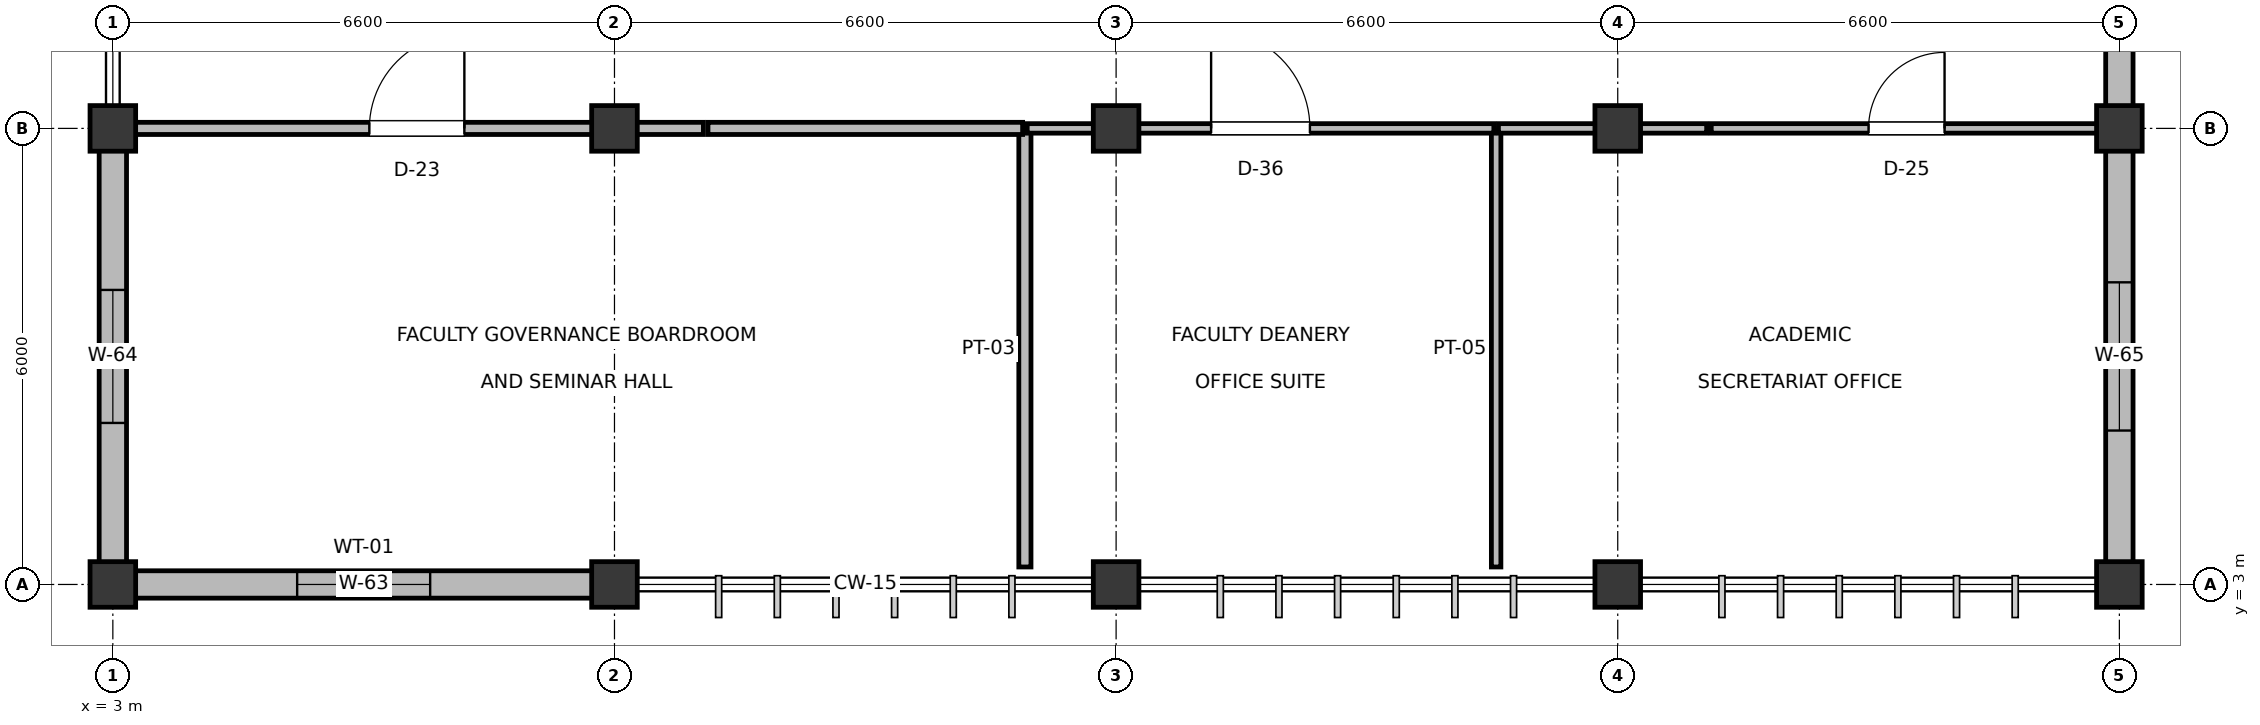
"""IFC4 building model, lengths in metres.
Left out: names, types, materials, properties, quantities, classifications, styles, units other than length and angle.
Written with IfcOpenShell. Run it as: python <this file> out.ifc"""

import sys

from ifc_helpers import new_model, si_unit, direction, frame, frame_2d, origin, origin_2d, place, context, subcontext, project, spatial, rectangle, extrude, element, fill, save


model = new_model("IFC4")
c1 = context("Model", 3, precision=1e-05, world=origin(), true_north=direction((0.0, 1.0)))
c2 = subcontext(c1, "Body", "Model", "MODEL_VIEW")
j1 = project(units=[si_unit("LENGTHUNIT", "METRE"), si_unit("PLANEANGLEUNIT", "RADIAN")], contexts=[c1])
p1 = place(None, origin())
s1 = spatial("IfcSite", under=j1, at=p1, CompositionType="ELEMENT")
p2 = place(p1, origin())
s2 = spatial("IfcBuilding", under=s1, at=p2, CompositionType="ELEMENT")
p3 = place(p2, frame((0.0, 0.0, 40.6)))
s3 = spatial("IfcBuildingStorey", under=s2, at=p3, CompositionType="ELEMENT", Elevation=40.6)
for number, where, z_axis, x_axis in (
    (1, (3.0, 3.0, 0.0), (0.0, 0.0, 1.0), (1.0, 0.0, 0.0)),
    (2, (3.0, 9.0, 0.0), (0.0, 0.0, 1.0), (1.0, 0.0, 0.0)),
    (3, (9.6, 3.0, 0.0), (0.0, 0.0, 1.0), (1.0, 0.0, 0.0)),
    (4, (9.6, 9.0, 0.0), (0.0, 0.0, 1.0), (1.0, 0.0, 0.0)),
    (5, (16.2, 3.0, 0.0), (0.0, 0.0, 1.0), (1.0, 0.0, 0.0)),
    (6, (16.2, 9.0, 0.0), (0.0, 0.0, 1.0), (1.0, 0.0, 0.0)),
    (7, (22.8, 3.0, 0.0), (0.0, 0.0, 1.0), (1.0, 0.0, 0.0)),
    (8, (22.8, 9.0, 0.0), (0.0, 0.0, 1.0), (1.0, 0.0, 0.0)),
    (9, (29.4, 3.0, 0.0), (0.0, 0.0, 1.0), (1.0, 0.0, 0.0)),
    (10, (29.4, 9.0, 0.0), (0.0, 0.0, 1.0), (1.0, 0.0, 0.0)),
):
    element("IfcColumn", number, at=place(p3, frame(where, z_axis=z_axis, x_axis=x_axis)), inside=s3, PredefinedType="COLUMN", context=c2, shape_type="SweptSolid", body=[
        extrude(rectangle(XDim=0.6, YDim=0.6, at=origin_2d()), origin(), (0.0, 0.0, 1.0), 4.0),
    ])
p4 = place(p3, frame((3.285, 3.0, 0.0), z_axis=(0.0, 0.0, 1.0), x_axis=(1.0, 0.0, 0.0)))
e11 = element("IfcWall", 11, at=p4, inside=s3, PredefinedType="SOLIDWALL", context=c2, shape_type="SweptSolid", body=[
    extrude(rectangle(XDim=6.03, YDim=0.36, at=frame_2d((3.015, 0.0))), origin(), (0.0, 0.0, 1.0), 3.045),
])
p5 = place(p4, frame((2.14, 0.0, 0.9)))
e12 = element("IfcOpeningElement", 12, at=p5, cuts=e11, PredefinedType="OPENING", context=c2, shape_type="SweptSolid", body=[
    extrude(rectangle(XDim=1.75, YDim=1.55, at=frame_2d((0.875, 0.775))), frame((0.0, 0.19, 0.0), z_axis=(0.0, -1.0, 0.0), x_axis=(1.0, 0.0, 0.0)), (0.0, 0.0, 1.0), 0.38),
])
p6 = place(p3, frame((3.0, 3.285, 0.0), z_axis=(0.0, 0.0, 1.0), x_axis=(0.0, 1.0, 0.0)))
e13 = element("IfcWall", 13, at=p6, inside=s3, PredefinedType="SOLIDWALL", context=c2, shape_type="SweptSolid", body=[
    extrude(rectangle(XDim=5.43, YDim=0.36, at=frame_2d((2.715, 0.0))), origin(), (0.0, 0.0, 1.0), 3.045),
])
p7 = place(p6, frame((1.84, 0.0, 0.9)))
e14 = element("IfcOpeningElement", 14, at=p7, cuts=e13, PredefinedType="OPENING", context=c2, shape_type="SweptSolid", body=[
    extrude(rectangle(XDim=1.75, YDim=1.75, at=frame_2d((0.875, 0.875))), frame((0.0, 0.19, 0.0), z_axis=(0.0, -1.0, 0.0), x_axis=(1.0, 0.0, 0.0)), (0.0, 0.0, 1.0), 0.38),
])
p8 = place(p3, frame((29.4, 3.285, 0.0), z_axis=(0.0, 0.0, 1.0), x_axis=(0.0, 1.0, 0.0)))
e15 = element("IfcWall", 15, at=p8, inside=s3, PredefinedType="SOLIDWALL", context=c2, shape_type="SweptSolid", body=[
    extrude(rectangle(XDim=5.43, YDim=0.36, at=frame_2d((2.715, 0.0))), origin(), (0.0, 0.0, 1.0), 3.095),
])
p9 = place(p8, frame((1.74, 0.0, 0.9)))
e16 = element("IfcOpeningElement", 16, at=p9, cuts=e15, PredefinedType="OPENING", context=c2, shape_type="SweptSolid", body=[
    extrude(rectangle(XDim=1.95, YDim=1.15, at=frame_2d((0.975, 0.575))), frame((0.0, 0.19, 0.0), z_axis=(0.0, -1.0, 0.0), x_axis=(1.0, 0.0, 0.0)), (0.0, 0.0, 1.0), 0.38),
])
p10 = place(p3, frame((29.4, 9.285, 0.0), z_axis=(0.0, 0.0, 1.0), x_axis=(0.0, 1.0, 0.0)))
e17 = element("IfcWall", 17, at=p10, inside=s3, PredefinedType="SOLIDWALL", context=c2, shape_type="SweptSolid", body=[
    extrude(rectangle(XDim=13.83, YDim=0.36, at=frame_2d((6.915, 0.0))), origin(), (0.0, 0.0, 1.0), 2.895),
])
p11 = place(p10, frame((5.94, 0.0, 0.9)))
e18 = element("IfcOpeningElement", 18, at=p11, cuts=e17, PredefinedType="OPENING", context=c2, shape_type="SweptSolid", body=[
    extrude(rectangle(XDim=1.95, YDim=1.35, at=frame_2d((0.975, 0.675))), frame((0.0, 0.19, 0.0), z_axis=(0.0, -1.0, 0.0), x_axis=(1.0, 0.0, 0.0)), (0.0, 0.0, 1.0), 0.38),
])
p12 = place(p3, frame((15.0, 3.23, 0.0), z_axis=(0.0, 0.0, 1.0), x_axis=(0.0, 1.0, 0.0)))
e19 = element("IfcWall", 19, at=p12, inside=s3, PredefinedType="PARTITIONING", context=c2, shape_type="SweptSolid", body=[
    extrude(rectangle(XDim=5.74, YDim=0.16, at=frame_2d((2.87, 0.0))), origin(), (0.0, 0.0, 1.0), 2.995),
])
p13 = place(p3, frame((3.23, 9.0, 0.0), z_axis=(0.0, 0.0, 1.0), x_axis=(1.0, 0.0, 0.0)))
e20 = element("IfcWall", 20, at=p13, inside=s3, PredefinedType="PARTITIONING", context=c2, shape_type="SweptSolid", body=[
    extrude(rectangle(XDim=7.54, YDim=0.16, at=frame_2d((3.77, 0.0))), origin(), (0.0, 0.0, 1.0), 2.925),
])
p14 = place(p13, frame((3.145, 0.0, 0.0)))
e21 = element("IfcOpeningElement", 21, at=p14, cuts=e20, PredefinedType="OPENING", context=c2, shape_type="SweptSolid", body=[
    extrude(rectangle(XDim=1.25, YDim=2.2, at=frame_2d((0.625, 1.1))), frame((0.0, 0.09, 0.0), z_axis=(0.0, -1.0, 0.0), x_axis=(1.0, 0.0, 0.0)), (0.0, 0.0, 1.0), 0.18),
])
p15 = place(p3, frame((10.83, 9.0, 0.0), z_axis=(0.0, 0.0, 1.0), x_axis=(1.0, 0.0, 0.0)))
e22 = element("IfcWall", 22, at=p15, inside=s3, PredefinedType="PARTITIONING", context=c2, shape_type="SweptSolid", body=[
    extrude(rectangle(XDim=4.14, YDim=0.16, at=frame_2d((2.07, 0.0))), origin(), (0.0, 0.0, 1.0), 2.995),
])
p16 = place(p3, frame((21.2, 3.23, 0.0), z_axis=(0.0, 0.0, 1.0), x_axis=(0.0, 1.0, 0.0)))
e23 = element("IfcWall", 23, at=p16, inside=s3, PredefinedType="PARTITIONING", context=c2, shape_type="SweptSolid", body=[
    extrude(rectangle(XDim=5.74, YDim=0.125, at=frame_2d((2.87, 0.0))), origin(), (0.0, 0.0, 1.0), 2.885),
])
p17 = place(p3, frame((15.03, 9.0, 0.0), z_axis=(0.0, 0.0, 1.0), x_axis=(1.0, 0.0, 0.0)))
e24 = element("IfcWall", 24, at=p17, inside=s3, PredefinedType="PARTITIONING", context=c2, shape_type="SweptSolid", body=[
    extrude(rectangle(XDim=6.14, YDim=0.125, at=frame_2d((3.07, 0.0))), origin(), (0.0, 0.0, 1.0), 2.885),
])
p18 = place(p17, frame((2.42, 0.0, 0.0)))
e25 = element("IfcOpeningElement", 25, at=p18, cuts=e24, PredefinedType="OPENING", context=c2, shape_type="SweptSolid", body=[
    extrude(rectangle(XDim=1.3, YDim=2.2, at=frame_2d((0.65, 1.1))), frame((0.0, 0.073, 0.0), z_axis=(0.0, -1.0, 0.0), x_axis=(1.0, 0.0, 0.0)), (0.0, 0.0, 1.0), 0.145),
])
p19 = place(p3, frame((24.03, 9.0, 0.0), z_axis=(0.0, 0.0, 1.0), x_axis=(1.0, 0.0, 0.0)))
e26 = element("IfcWall", 26, at=p19, inside=s3, PredefinedType="PARTITIONING", context=c2, shape_type="SweptSolid", body=[
    extrude(rectangle(XDim=5.14, YDim=0.125, at=frame_2d((2.57, 0.0))), origin(), (0.0, 0.0, 1.0), 2.995),
])
p20 = place(p19, frame((2.07, 0.0, 0.0)))
e27 = element("IfcOpeningElement", 27, at=p20, cuts=e26, PredefinedType="OPENING", context=c2, shape_type="SweptSolid", body=[
    extrude(rectangle(XDim=1.0, YDim=2.15, at=frame_2d((0.5, 1.075))), frame((0.0, 0.073, 0.0), z_axis=(0.0, -1.0, 0.0), x_axis=(1.0, 0.0, 0.0)), (0.0, 0.0, 1.0), 0.145),
])
p21 = place(p3, frame((21.23, 9.0, 0.0), z_axis=(0.0, 0.0, 1.0), x_axis=(1.0, 0.0, 0.0)))
e28 = element("IfcWall", 28, at=p21, inside=s3, PredefinedType="PARTITIONING", context=c2, shape_type="SweptSolid", body=[
    extrude(rectangle(XDim=2.74, YDim=0.125, at=frame_2d((1.37, 0.0))), origin(), (0.0, 0.0, 1.0), 2.885),
])
p22 = place(p5, frame((1.75, 0.0, 0.0), z_axis=(0.0, 0.0, 1.0), x_axis=(-1.0, 0.0, 0.0)))
e29 = element("IfcWindow", 29, at=p22, inside=s3, PartitioningType="DOUBLE_PANEL_VERTICAL", PredefinedType="WINDOW", context=c2, shape_type="SweptSolid", body=[
    extrude(rectangle(XDim=1.75, YDim=1.55, at=frame_2d((0.875, 0.775))), frame((0.0, 0.03, 0.0), z_axis=(0.0, -1.0, 0.0), x_axis=(1.0, 0.0, 0.0)), (0.0, 0.0, 1.0), 0.06),
])
fill(e12, e29)
p23 = place(p7, origin())
e30 = element("IfcWindow", 30, at=p23, inside=s3, PartitioningType="DOUBLE_PANEL_VERTICAL", PredefinedType="WINDOW", context=c2, shape_type="SweptSolid", body=[
    extrude(rectangle(XDim=1.75, YDim=1.75, at=frame_2d((0.875, 0.875))), frame((0.0, 0.03, 0.0), z_axis=(0.0, -1.0, 0.0), x_axis=(1.0, 0.0, 0.0)), (0.0, 0.0, 1.0), 0.06),
])
fill(e14, e30)
p24 = place(p9, frame((1.95, 0.0, 0.0), z_axis=(0.0, 0.0, 1.0), x_axis=(-1.0, 0.0, 0.0)))
e31 = element("IfcWindow", 31, at=p24, inside=s3, PartitioningType="DOUBLE_PANEL_VERTICAL", PredefinedType="WINDOW", context=c2, shape_type="SweptSolid", body=[
    extrude(rectangle(XDim=1.95, YDim=1.15, at=frame_2d((0.975, 0.575))), frame((0.0, 0.03, 0.0), z_axis=(0.0, -1.0, 0.0), x_axis=(1.0, 0.0, 0.0)), (0.0, 0.0, 1.0), 0.06),
])
fill(e16, e31)
p25 = place(p14, origin())
e32 = element("IfcDoor", 32, at=p25, inside=s3, OperationType="SINGLE_SWING_RIGHT", PredefinedType="DOOR", context=c2, shape_type="SweptSolid", body=[
    extrude(rectangle(XDim=1.25, YDim=2.2, at=frame_2d((0.625, 1.1))), frame((0.0, 0.025, 0.0), z_axis=(0.0, -1.0, 0.0), x_axis=(1.0, 0.0, 0.0)), (0.0, 0.0, 1.0), 0.05),
])
fill(e21, e32)
p26 = place(p18, origin())
e33 = element("IfcDoor", 33, at=p26, inside=s3, OperationType="SINGLE_SWING_LEFT", PredefinedType="DOOR", context=c2, shape_type="SweptSolid", body=[
    extrude(rectangle(XDim=1.3, YDim=2.2, at=frame_2d((0.65, 1.1))), frame((0.0, 0.025, 0.0), z_axis=(0.0, -1.0, 0.0), x_axis=(1.0, 0.0, 0.0)), (0.0, 0.0, 1.0), 0.05),
])
fill(e25, e33)
p27 = place(p20, origin())
e34 = element("IfcDoor", 34, at=p27, inside=s3, OperationType="SINGLE_SWING_RIGHT", PredefinedType="DOOR", context=c2, shape_type="SweptSolid", body=[
    extrude(rectangle(XDim=1.0, YDim=2.15, at=frame_2d((0.5, 1.075))), frame((0.0, 0.025, 0.0), z_axis=(0.0, -1.0, 0.0), x_axis=(1.0, 0.0, 0.0)), (0.0, 0.0, 1.0), 0.05),
])
fill(e27, e34)
save(model, sys.argv[1])
